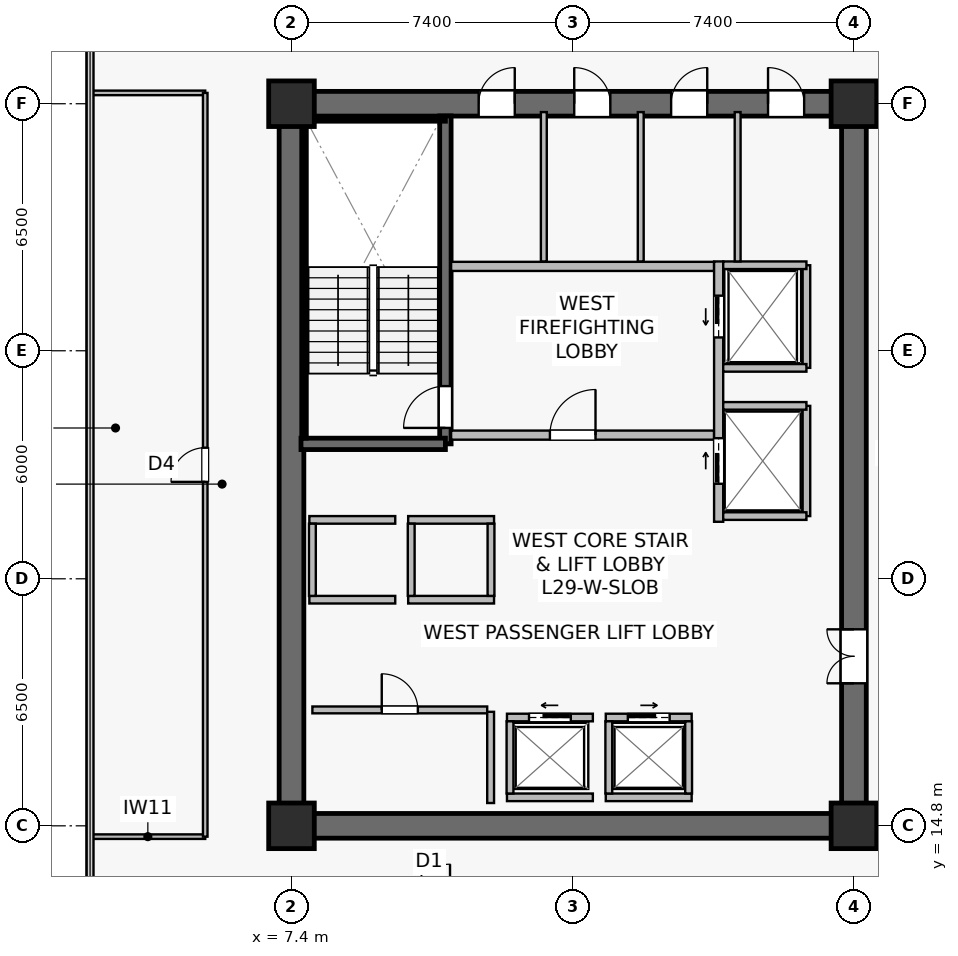
"""IFC4 building model, lengths in metres.
Left out: names, types, materials, properties, quantities, classifications, styles, units other than length and angle.
Written with IfcOpenShell. Run it as: python <this file> out.ifc"""

import sys

from ifc_helpers import new_model, si_unit, direction, frame, frame_2d, origin, origin_2d, place, context, subcontext, project, spatial, rectangle, extrude, source, transform, mapped, element, fill, save


model = new_model("IFC4")
c1 = context("Model", 3, precision=1e-05, world=origin(), true_north=direction((0.0, 1.0)))
c2 = subcontext(c1, "Body", "Model", "MODEL_VIEW")
j1 = project(units=[si_unit("LENGTHUNIT", "METRE"), si_unit("PLANEANGLEUNIT", "RADIAN")], contexts=[c1])
p1 = place(None, origin())
s1 = spatial("IfcSite", under=j1, at=p1, CompositionType="ELEMENT")
p2 = place(p1, origin())
s2 = spatial("IfcBuilding", under=s1, at=p2, CompositionType="ELEMENT")
p3 = place(p2, frame((0.0, 0.0, 121.5)))
s3 = spatial("IfcBuildingStorey", under=s2, at=p3, CompositionType="ELEMENT", Elevation=121.5)
p4 = place(p3, frame((7.075, 14.8, 0.0), z_axis=(0.0, 0.0, 1.0), x_axis=(1.0, 0.0, 0.0)))
e1 = element("IfcWall", 1, at=p4, inside=s3, PredefinedType="SHEAR", context=c2, shape_type="SweptSolid", body=[
    extrude(rectangle(XDim=15.45, YDim=0.65, at=frame_2d((7.725, 0.0))), origin(), (0.0, 0.0, 1.0), 3.79),
])
p5 = place(p3, frame((7.075, 33.8, 0.0), z_axis=(0.0, 0.0, 1.0), x_axis=(1.0, 0.0, 0.0)))
e2 = element("IfcWall", 2, at=p5, inside=s3, PredefinedType="SHEAR", context=c2, shape_type="SweptSolid", body=[
    extrude(rectangle(XDim=15.45, YDim=0.65, at=frame_2d((7.725, 0.0))), origin(), (0.0, 0.0, 1.0), 3.79),
])
p6 = place(p5, frame((5.25, 0.0, 0.0)))
e3 = element("IfcOpeningElement", 3, at=p6, cuts=e2, PredefinedType="OPENING", context=c2, shape_type="SweptSolid", body=[
    extrude(rectangle(XDim=0.95, YDim=2.15, at=frame_2d((0.475, 1.075))), frame((0.0, 0.335, 0.0), z_axis=(0.0, -1.0, 0.0), x_axis=(1.0, 0.0, 0.0)), (0.0, 0.0, 1.0), 0.67),
])
p7 = place(p5, frame((7.765, 0.0, 0.0)))
e4 = element("IfcOpeningElement", 4, at=p7, cuts=e2, PredefinedType="OPENING", context=c2, shape_type="SweptSolid", body=[
    extrude(rectangle(XDim=0.95, YDim=2.15, at=frame_2d((0.475, 1.075))), frame((0.0, 0.335, 0.0), z_axis=(0.0, -1.0, 0.0), x_axis=(1.0, 0.0, 0.0)), (0.0, 0.0, 1.0), 0.67),
])
p8 = place(p5, frame((10.315, 0.0, 0.0)))
e5 = element("IfcOpeningElement", 5, at=p8, cuts=e2, PredefinedType="OPENING", context=c2, shape_type="SweptSolid", body=[
    extrude(rectangle(XDim=0.95, YDim=2.15, at=frame_2d((0.475, 1.075))), frame((0.0, 0.335, 0.0), z_axis=(0.0, -1.0, 0.0), x_axis=(1.0, 0.0, 0.0)), (0.0, 0.0, 1.0), 0.67),
])
p9 = place(p5, frame((12.865, 0.0, 0.0)))
e6 = element("IfcOpeningElement", 6, at=p9, cuts=e2, PredefinedType="OPENING", context=c2, shape_type="SweptSolid", body=[
    extrude(rectangle(XDim=0.95, YDim=2.15, at=frame_2d((0.475, 1.075))), frame((0.0, 0.335, 0.0), z_axis=(0.0, -1.0, 0.0), x_axis=(1.0, 0.0, 0.0)), (0.0, 0.0, 1.0), 0.67),
])
p10 = place(p3, frame((7.4, 15.125, 0.0), z_axis=(0.0, 0.0, 1.0), x_axis=(0.0, 1.0, 0.0)))
e7 = element("IfcWall", 7, at=p10, inside=s3, PredefinedType="SHEAR", context=c2, shape_type="SweptSolid", body=[
    extrude(rectangle(XDim=18.35, YDim=0.65, at=frame_2d((9.175, 0.0))), origin(), (0.0, 0.0, 1.0), 3.79),
])
p11 = place(p3, frame((22.2, 15.125, 0.0), z_axis=(0.0, 0.0, 1.0), x_axis=(0.0, 1.0, 0.0)))
e8 = element("IfcWall", 8, at=p11, inside=s3, PredefinedType="SHEAR", context=c2, shape_type="SweptSolid", body=[
    extrude(rectangle(XDim=18.35, YDim=0.65, at=frame_2d((9.175, 0.0))), origin(), (0.0, 0.0, 1.0), 3.79),
])
p12 = place(p11, frame((3.425, 0.0, 0.0)))
e9 = element("IfcOpeningElement", 9, at=p12, cuts=e8, PredefinedType="OPENING", context=c2, shape_type="SweptSolid", body=[
    extrude(rectangle(XDim=1.42, YDim=2.2, at=frame_2d((0.71, 1.1))), frame((0.0, 0.335, 0.0), z_axis=(0.0, -1.0, 0.0), x_axis=(1.0, 0.0, 0.0)), (0.0, 0.0, 1.0), 0.67),
])
p13 = place(p3, frame((11.45, 24.85, 0.0), z_axis=(0.0, 0.0, 1.0), x_axis=(0.0, 1.0, 0.0)))
e10 = element("IfcWall", 10, at=p13, inside=s3, PredefinedType="SHEAR", context=c2, shape_type="SweptSolid", body=[
    extrude(rectangle(XDim=8.63, YDim=0.3, at=frame_2d((4.315, 0.0))), origin(), (0.0, 0.0, 1.0), 3.79),
])
p14 = place(p13, frame((0.42, 0.0, 0.0)))
e11 = element("IfcOpeningElement", 11, at=p14, cuts=e10, PredefinedType="OPENING", context=c2, shape_type="SweptSolid", body=[
    extrude(rectangle(XDim=1.1, YDim=2.15, at=frame_2d((0.55, 1.075))), frame((0.0, 0.16, 0.0), z_axis=(0.0, -1.0, 0.0), x_axis=(1.0, 0.0, 0.0)), (0.0, 0.0, 1.0), 0.32),
])
p15 = place(p3, frame((7.65, 24.85, 0.0), z_axis=(0.0, 0.0, 1.0), x_axis=(1.0, 0.0, 0.0)))
e12 = element("IfcWall", 12, at=p15, inside=s3, PredefinedType="SHEAR", context=c2, shape_type="SweptSolid", body=[
    extrude(rectangle(XDim=3.8, YDim=0.3, at=frame_2d((1.9, 0.0))), origin(), (0.0, 0.0, 1.0), 3.79),
])
p16 = place(p3, frame((7.73, 33.4, 0.0), z_axis=(0.0, 0.0, 1.0), x_axis=(1.0, 0.0, 0.0)))
e13 = element("IfcWall", 13, at=p16, inside=s3, PredefinedType="SOLIDWALL", context=c2, shape_type="SweptSolid", body=[
    extrude(rectangle(XDim=3.72, YDim=0.12, at=frame_2d((1.86, 0.0))), origin(), (0.0, 0.0, 1.0), 3.79),
])
p17 = place(p3, frame((7.73, 25.0, 0.0), z_axis=(0.0, 0.0, 1.0), x_axis=(0.0, 1.0, 0.0)))
e14 = element("IfcWall", 14, at=p17, inside=s3, PredefinedType="SOLIDWALL", context=c2, shape_type="SweptSolid", body=[
    extrude(rectangle(XDim=8.32, YDim=0.12, at=frame_2d((4.16, 0.0))), origin(), (0.0, 0.0, 1.0), 3.79),
])
m1 = source(origin(), c2, "Body", "SweptSolid", [
    extrude(rectangle(XDim=1.2, YDim=1.2, at=origin_2d()), origin(), (0.0, 0.0, 1.0), 4.1),
])
for number, where, z_axis, x_axis in (
    (15, (7.4, 14.8, 0.0), (0.0, 0.0, 1.0), (1.0, 0.0, 0.0)),
    (16, (22.2, 14.8, 0.0), (0.0, 0.0, 1.0), (1.0, 0.0, 0.0)),
    (17, (7.4, 33.8, 0.0), (0.0, 0.0, 1.0), (1.0, 0.0, 0.0)),
    (18, (22.2, 33.8, 0.0), (0.0, 0.0, 1.0), (1.0, 0.0, 0.0)),
):
    element("IfcColumn", number, at=place(p3, frame(where, z_axis=z_axis, x_axis=x_axis)), inside=s3, PredefinedType="COLUMN", context=c2, shape_type="MappedRepresentation", body=[
        mapped(m1, transform((0.0, 0.0, 0.0), scale=1.0)),
    ])
p18 = place(p3, frame((11.6, 25.08, 0.0), z_axis=(0.0, 0.0, 1.0), x_axis=(1.0, 0.0, 0.0)))
e19 = element("IfcWall", 19, at=p18, inside=s3, PredefinedType="SOLIDWALL", context=c2, shape_type="SweptSolid", body=[
    extrude(rectangle(XDim=6.92, YDim=0.24, at=frame_2d((3.46, 0.0))), origin(), (0.0, 0.0, 1.0), 3.125),
])
p19 = place(p18, frame((2.6, 0.0, 0.0)))
e20 = element("IfcOpeningElement", 20, at=p19, cuts=e19, PredefinedType="OPENING", context=c2, shape_type="SweptSolid", body=[
    extrude(rectangle(XDim=1.2, YDim=2.16, at=frame_2d((0.6, 1.08))), frame((0.0, 0.13, 0.0), z_axis=(0.0, -1.0, 0.0), x_axis=(1.0, 0.0, 0.0)), (0.0, 0.0, 1.0), 0.26),
])
p20 = place(p3, frame((11.6, 29.52, 0.0), z_axis=(0.0, 0.0, 1.0), x_axis=(1.0, 0.0, 0.0)))
e21 = element("IfcWall", 21, at=p20, inside=s3, PredefinedType="SOLIDWALL", context=c2, shape_type="SweptSolid", body=[
    extrude(rectangle(XDim=6.92, YDim=0.24, at=frame_2d((3.46, 0.0))), origin(), (0.0, 0.0, 1.0), 3.125),
])
p21 = place(p3, frame((18.64, 22.8, 0.0), z_axis=(0.0, 0.0, 1.0), x_axis=(0.0, 1.0, 0.0)))
e22 = element("IfcWall", 22, at=p21, inside=s3, PredefinedType="SOLIDWALL", context=c2, shape_type="SweptSolid", body=[
    extrude(rectangle(XDim=6.85, YDim=0.24, at=frame_2d((3.425, 0.0))), origin(), (0.0, 0.0, 1.0), 2.875),
])
p22 = place(p21, frame((4.85, 0.0, 0.0)))
e23 = element("IfcOpeningElement", 23, at=p22, cuts=e22, PredefinedType="OPENING", context=c2, shape_type="SweptSolid", body=[
    extrude(rectangle(XDim=1.1, YDim=2.22, at=frame_2d((0.55, 1.11))), frame((0.0, 0.13, 0.0), z_axis=(0.0, -1.0, 0.0), x_axis=(1.0, 0.0, 0.0)), (0.0, 0.0, 1.0), 0.26),
])
p23 = place(p21, frame((1.0, 0.0, 0.0)))
e24 = element("IfcOpeningElement", 24, at=p23, cuts=e22, PredefinedType="OPENING", context=c2, shape_type="SweptSolid", body=[
    extrude(rectangle(XDim=1.2, YDim=2.22, at=frame_2d((0.6, 1.11))), frame((0.0, 0.13, 0.0), z_axis=(0.0, -1.0, 0.0), x_axis=(1.0, 0.0, 0.0)), (0.0, 0.0, 1.0), 0.26),
])
p24 = place(p3, frame((13.07, 17.65, 0.0), z_axis=(0.0, 0.0, 1.0), x_axis=(1.0, 0.0, 0.0)))
e25 = element("IfcWall", 25, at=p24, inside=s3, PredefinedType="SOLIDWALL", context=c2, shape_type="SweptSolid", body=[
    extrude(rectangle(XDim=2.26, YDim=0.2, at=frame_2d((1.13, 0.0))), origin(), (0.0, 0.0, 1.0), 3.125),
])
p25 = place(p24, frame((0.58, 0.0, 0.0)))
e26 = element("IfcOpeningElement", 26, at=p25, cuts=e25, PredefinedType="OPENING", context=c2, shape_type="SweptSolid", body=[
    extrude(rectangle(XDim=1.1, YDim=2.22, at=frame_2d((0.55, 1.11))), frame((0.0, 0.11, 0.0), z_axis=(0.0, -1.0, 0.0), x_axis=(1.0, 0.0, 0.0)), (0.0, 0.0, 1.0), 0.22),
])
p26 = place(p3, frame((13.07, 15.55, 0.0), z_axis=(0.0, 0.0, 1.0), x_axis=(1.0, 0.0, 0.0)))
e27 = element("IfcWall", 27, at=p26, inside=s3, PredefinedType="SOLIDWALL", context=c2, shape_type="SweptSolid", body=[
    extrude(rectangle(XDim=2.26, YDim=0.2, at=frame_2d((1.13, 0.0))), origin(), (0.0, 0.0, 1.0), 3.125),
])
p27 = place(p3, frame((13.15, 15.65, 0.0), z_axis=(0.0, 0.0, 1.0), x_axis=(0.0, 1.0, 0.0)))
e28 = element("IfcWall", 28, at=p27, inside=s3, PredefinedType="SOLIDWALL", context=c2, shape_type="SweptSolid", body=[
    extrude(rectangle(XDim=1.9, YDim=0.18, at=frame_2d((0.95, 0.0))), origin(), (0.0, 0.0, 1.0), 3.79),
])
p28 = place(p3, frame((15.67, 17.65, 0.0), z_axis=(0.0, 0.0, 1.0), x_axis=(1.0, 0.0, 0.0)))
e29 = element("IfcWall", 29, at=p28, inside=s3, PredefinedType="SOLIDWALL", context=c2, shape_type="SweptSolid", body=[
    extrude(rectangle(XDim=2.26, YDim=0.2, at=frame_2d((1.13, 0.0))), origin(), (0.0, 0.0, 1.0), 3.79),
])
p29 = place(p28, frame((0.58, 0.0, 0.0)))
e30 = element("IfcOpeningElement", 30, at=p29, cuts=e29, PredefinedType="OPENING", context=c2, shape_type="SweptSolid", body=[
    extrude(rectangle(XDim=1.1, YDim=2.22, at=frame_2d((0.55, 1.11))), frame((0.0, 0.11, 0.0), z_axis=(0.0, -1.0, 0.0), x_axis=(1.0, 0.0, 0.0)), (0.0, 0.0, 1.0), 0.22),
])
p30 = place(p3, frame((15.67, 15.55, 0.0), z_axis=(0.0, 0.0, 1.0), x_axis=(1.0, 0.0, 0.0)))
e31 = element("IfcWall", 31, at=p30, inside=s3, PredefinedType="SOLIDWALL", context=c2, shape_type="SweptSolid", body=[
    extrude(rectangle(XDim=2.26, YDim=0.2, at=frame_2d((1.13, 0.0))), origin(), (0.0, 0.0, 1.0), 3.79),
])
for number, where, z_axis, x_axis in (
    (32, (15.75, 15.65, 0.0), (0.0, 0.0, 1.0), (0.0, 1.0, 0.0)),
    (33, (17.85, 15.65, 0.0), (0.0, 0.0, 1.0), (0.0, 1.0, 0.0)),
):
    element("IfcWall", number, at=place(p3, frame(where, z_axis=z_axis, x_axis=x_axis)), inside=s3, PredefinedType="SOLIDWALL", context=c2, shape_type="SweptSolid", body=[
        extrude(rectangle(XDim=1.9, YDim=0.18, at=frame_2d((0.95, 0.0))), origin(), (0.0, 0.0, 1.0), 3.79),
    ])
for number, where, z_axis, x_axis in (
    (34, (7.87, 20.75, 0.0), (0.0, 0.0, 1.0), (1.0, 0.0, 0.0)),
    (35, (7.87, 22.85, 0.0), (0.0, 0.0, 1.0), (1.0, 0.0, 0.0)),
):
    element("IfcWall", number, at=place(p3, frame(where, z_axis=z_axis, x_axis=x_axis)), inside=s3, PredefinedType="SOLIDWALL", context=c2, shape_type="SweptSolid", body=[
        extrude(rectangle(XDim=2.26, YDim=0.2, at=frame_2d((1.13, 0.0))), origin(), (0.0, 0.0, 1.0), 3.79),
    ])
p31 = place(p3, frame((7.95, 20.85, 0.0), z_axis=(0.0, 0.0, 1.0), x_axis=(0.0, 1.0, 0.0)))
e36 = element("IfcWall", 36, at=p31, inside=s3, PredefinedType="SOLIDWALL", context=c2, shape_type="SweptSolid", body=[
    extrude(rectangle(XDim=1.9, YDim=0.18, at=frame_2d((0.95, 0.0))), origin(), (0.0, 0.0, 1.0), 3.79),
])
for number, where, z_axis, x_axis in (
    (37, (10.47, 20.75, 0.0), (0.0, 0.0, 1.0), (1.0, 0.0, 0.0)),
    (38, (10.47, 22.85, 0.0), (0.0, 0.0, 1.0), (1.0, 0.0, 0.0)),
):
    element("IfcWall", number, at=place(p3, frame(where, z_axis=z_axis, x_axis=x_axis)), inside=s3, PredefinedType="SOLIDWALL", context=c2, shape_type="SweptSolid", body=[
        extrude(rectangle(XDim=2.26, YDim=0.2, at=frame_2d((1.13, 0.0))), origin(), (0.0, 0.0, 1.0), 3.79),
    ])
for number, where, z_axis, x_axis in (
    (39, (10.55, 20.85, 0.0), (0.0, 0.0, 1.0), (0.0, 1.0, 0.0)),
    (40, (12.65, 20.85, 0.0), (0.0, 0.0, 1.0), (0.0, 1.0, 0.0)),
):
    element("IfcWall", number, at=place(p3, frame(where, z_axis=z_axis, x_axis=x_axis)), inside=s3, PredefinedType="SOLIDWALL", context=c2, shape_type="SweptSolid", body=[
        extrude(rectangle(XDim=1.9, YDim=0.18, at=frame_2d((0.95, 0.0))), origin(), (0.0, 0.0, 1.0), 3.79),
    ])
p32 = place(p3, frame((20.95, 26.85, 0.0), z_axis=(0.0, 0.0, 1.0), x_axis=(0.0, 1.0, 0.0)))
e41 = element("IfcWall", 41, at=p32, inside=s3, PredefinedType="SOLIDWALL", context=c2, shape_type="SweptSolid", body=[
    extrude(rectangle(XDim=2.7, YDim=0.2, at=frame_2d((1.35, 0.0))), origin(), (0.0, 0.0, 1.0), 3.79),
])
p33 = place(p3, frame((18.76, 29.55, 0.0), z_axis=(0.0, 0.0, 1.0), x_axis=(1.0, 0.0, 0.0)))
e42 = element("IfcWall", 42, at=p33, inside=s3, PredefinedType="SOLIDWALL", context=c2, shape_type="SweptSolid", body=[
    extrude(rectangle(XDim=2.19, YDim=0.2, at=frame_2d((1.095, 0.0))), origin(), (0.0, 0.0, 1.0), 3.79),
])
p34 = place(p3, frame((18.76, 26.85, 0.0), z_axis=(0.0, 0.0, 1.0), x_axis=(1.0, 0.0, 0.0)))
e43 = element("IfcWall", 43, at=p34, inside=s3, PredefinedType="SOLIDWALL", context=c2, shape_type="SweptSolid", body=[
    extrude(rectangle(XDim=2.19, YDim=0.2, at=frame_2d((1.095, 0.0))), origin(), (0.0, 0.0, 1.0), 3.187),
])
p35 = place(p3, frame((20.95, 22.95, 0.0), z_axis=(0.0, 0.0, 1.0), x_axis=(0.0, 1.0, 0.0)))
e44 = element("IfcWall", 44, at=p35, inside=s3, PredefinedType="SOLIDWALL", context=c2, shape_type="SweptSolid", body=[
    extrude(rectangle(XDim=2.9, YDim=0.2, at=frame_2d((1.45, 0.0))), origin(), (0.0, 0.0, 1.0), 2.875),
])
for number, where, z_axis, x_axis in (
    (45, (18.76, 25.85, 0.0), (0.0, 0.0, 1.0), (1.0, 0.0, 0.0)),
    (46, (18.76, 22.95, 0.0), (0.0, 0.0, 1.0), (1.0, 0.0, 0.0)),
):
    element("IfcWall", number, at=place(p3, frame(where, z_axis=z_axis, x_axis=x_axis)), inside=s3, PredefinedType="SOLIDWALL", context=c2, shape_type="SweptSolid", body=[
        extrude(rectangle(XDim=2.19, YDim=0.2, at=frame_2d((1.095, 0.0))), origin(), (0.0, 0.0, 1.0), 3.79),
    ])
p36 = place(p3, frame((7.95, 17.85, 0.0), z_axis=(0.0, 0.0, 1.0), x_axis=(1.0, 0.0, 0.0)))
e47 = element("IfcWall", 47, at=p36, inside=s3, PredefinedType="SOLIDWALL", context=c2, shape_type="SweptSolid", body=[
    extrude(rectangle(XDim=4.6, YDim=0.18, at=frame_2d((2.3, 0.0))), origin(), (0.0, 0.0, 1.0), 3.79),
])
p37 = place(p36, frame((1.825, 0.0, 0.0)))
e48 = element("IfcOpeningElement", 48, at=p37, cuts=e47, PredefinedType="OPENING", context=c2, shape_type="SweptSolid", body=[
    extrude(rectangle(XDim=0.95, YDim=2.15, at=frame_2d((0.475, 1.075))), frame((0.0, 0.1, 0.0), z_axis=(0.0, -1.0, 0.0), x_axis=(1.0, 0.0, 0.0)), (0.0, 0.0, 1.0), 0.2),
])
p38 = place(p3, frame((12.64, 15.4, 0.0), z_axis=(0.0, 0.0, 1.0), x_axis=(0.0, 1.0, 0.0)))
e49 = element("IfcWall", 49, at=p38, inside=s3, PredefinedType="SOLIDWALL", context=c2, shape_type="SweptSolid", body=[
    extrude(rectangle(XDim=2.4, YDim=0.18, at=frame_2d((1.2, 0.0))), origin(), (0.0, 0.0, 1.0), 3.79),
])
for number, where, z_axis, x_axis in (
    (50, (14.04, 29.65, 0.0), (0.0, 0.0, 1.0), (0.0, 1.0, 0.0)),
    (51, (16.59, 29.65, 0.0), (0.0, 0.0, 1.0), (0.0, 1.0, 0.0)),
    (52, (19.14, 29.65, 0.0), (0.0, 0.0, 1.0), (0.0, 1.0, 0.0)),
):
    element("IfcWall", number, at=place(p3, frame(where, z_axis=z_axis, x_axis=x_axis)), inside=s3, PredefinedType="PLUMBINGWALL", context=c2, shape_type="SweptSolid", body=[
        extrude(rectangle(XDim=3.93, YDim=0.155, at=frame_2d((1.965, 0.0))), origin(), (0.0, 0.0, 1.0), 3.79),
    ])
for number, where, z_axis, x_axis in (
    (53, (2.11, 14.515, 0.0), (0.0, 0.0, 1.0), (1.0, 0.0, 0.0)),
    (54, (2.11, 34.085, 0.0), (0.0, 0.0, 1.0), (1.0, 0.0, 0.0)),
):
    element("IfcWall", number, at=place(p3, frame(where, z_axis=z_axis, x_axis=x_axis)), inside=s3, PredefinedType="PARTITIONING", context=c2, shape_type="SweptSolid", body=[
        extrude(rectangle(XDim=3.02, YDim=0.12, at=frame_2d((1.51, 0.0))), origin(), (0.0, 0.0, 1.0), 3.79),
    ])
p39 = place(p3, frame((5.13, 14.515, 0.0), z_axis=(0.0, 0.0, 1.0), x_axis=(0.0, 1.0, 0.0)))
e55 = element("IfcWall", 55, at=p39, inside=s3, PredefinedType="PARTITIONING", context=c2, shape_type="SweptSolid", body=[
    extrude(rectangle(XDim=19.57, YDim=0.12, at=frame_2d((9.785, 0.0))), origin(), (0.0, 0.0, 1.0), 3.79),
])
p40 = place(p39, frame((9.335, 0.0, 0.0)))
e56 = element("IfcOpeningElement", 56, at=p40, cuts=e55, PredefinedType="OPENING", context=c2, shape_type="SweptSolid", body=[
    extrude(rectangle(XDim=0.9, YDim=2.1, at=frame_2d((0.45, 1.05))), frame((0.0, 0.07, 0.0), z_axis=(0.0, -1.0, 0.0), x_axis=(1.0, 0.0, 0.0)), (0.0, 0.0, 1.0), 0.14),
])
m2 = source(origin(), c2, "Body", "SweptSolid", [
    extrude(rectangle(XDim=1.1, YDim=2.15, at=frame_2d((0.55, 1.075))), frame((0.0, 0.025, 0.0), z_axis=(0.0, -1.0, 0.0), x_axis=(1.0, 0.0, 0.0)), (0.0, 0.0, 1.0), 0.05),
])
p41 = place(p14, origin())
e57 = element("IfcDoor", 57, at=p41, inside=s3, OperationType="SINGLE_SWING_LEFT", PredefinedType="DOOR", context=c2, shape_type="MappedRepresentation", body=[
    mapped(m2, transform((0.0, 0.0, 0.0), scale=1.0)),
])
fill(e11, e57)
m3 = source(origin(), c2, "Body", "SweptSolid", [
    extrude(rectangle(XDim=1.2, YDim=2.16, at=frame_2d((0.6, 1.08))), frame((0.0, 0.025, 0.0), z_axis=(0.0, -1.0, 0.0), x_axis=(1.0, 0.0, 0.0)), (0.0, 0.0, 1.0), 0.05),
])
p42 = place(p19, origin())
e58 = element("IfcDoor", 58, at=p42, inside=s3, OperationType="SINGLE_SWING_RIGHT", PredefinedType="DOOR", context=c2, shape_type="MappedRepresentation", body=[
    mapped(m3, transform((0.0, 0.0, 0.0), scale=1.0)),
])
fill(e20, e58)
m4 = source(origin(), c2, "Body", "SweptSolid", [
    extrude(rectangle(XDim=1.1, YDim=2.22, at=frame_2d((0.55, 1.11))), frame((0.0, 0.025, 0.0), z_axis=(0.0, -1.0, 0.0), x_axis=(1.0, 0.0, 0.0)), (0.0, 0.0, 1.0), 0.05),
])
p43 = place(p25, origin())
e59 = element("IfcDoor", 59, at=p43, inside=s3, OperationType="SLIDING_TO_LEFT", PredefinedType="USERDEFINED", context=c2, shape_type="MappedRepresentation", body=[
    mapped(m4, transform((0.0, 0.0, 0.0), scale=1.0)),
])
fill(e26, e59)
p44 = place(p29, origin())
e60 = element("IfcDoor", 60, at=p44, inside=s3, OperationType="SLIDING_TO_RIGHT", PredefinedType="USERDEFINED", context=c2, shape_type="MappedRepresentation", body=[
    mapped(m4, transform((0.0, 0.0, 0.0), scale=1.0)),
])
fill(e30, e60)
p45 = place(p22, origin())
e61 = element("IfcDoor", 61, at=p45, inside=s3, OperationType="SLIDING_TO_LEFT", PredefinedType="USERDEFINED", context=c2, shape_type="MappedRepresentation", body=[
    mapped(m4, transform((0.0, 0.0, 0.0), scale=1.0)),
])
fill(e23, e61)
m5 = source(origin(), c2, "Body", "SweptSolid", [
    extrude(rectangle(XDim=1.2, YDim=2.22, at=frame_2d((0.6, 1.11))), frame((0.0, 0.025, 0.0), z_axis=(0.0, -1.0, 0.0), x_axis=(1.0, 0.0, 0.0)), (0.0, 0.0, 1.0), 0.05),
])
p46 = place(p23, origin())
e62 = element("IfcDoor", 62, at=p46, inside=s3, OperationType="SLIDING_TO_RIGHT", PredefinedType="USERDEFINED", context=c2, shape_type="MappedRepresentation", body=[
    mapped(m5, transform((0.0, 0.0, 0.0), scale=1.0)),
])
fill(e24, e62)
m6 = source(origin(), c2, "Body", "SweptSolid", [
    extrude(rectangle(XDim=0.95, YDim=2.15, at=frame_2d((0.475, 1.075))), frame((0.0, 0.025, 0.0), z_axis=(0.0, -1.0, 0.0), x_axis=(1.0, 0.0, 0.0)), (0.0, 0.0, 1.0), 0.05),
])
p47 = place(p37, origin())
e63 = element("IfcDoor", 63, at=p47, inside=s3, OperationType="SINGLE_SWING_LEFT", PredefinedType="DOOR", context=c2, shape_type="MappedRepresentation", body=[
    mapped(m6, transform((0.0, 0.0, 0.0), scale=1.0)),
])
fill(e48, e63)
m7 = source(origin(), c2, "Body", "SweptSolid", [
    extrude(rectangle(XDim=1.42, YDim=2.2, at=frame_2d((0.71, 1.1))), frame((0.0, 0.025, 0.0), z_axis=(0.0, -1.0, 0.0), x_axis=(1.0, 0.0, 0.0)), (0.0, 0.0, 1.0), 0.05),
])
p48 = place(p12, origin())
e64 = element("IfcDoor", 64, at=p48, inside=s3, OperationType="DOUBLE_DOOR_SINGLE_SWING", PredefinedType="DOOR", context=c2, shape_type="MappedRepresentation", body=[
    mapped(m7, transform((0.0, 0.0, 0.0), scale=1.0)),
])
fill(e9, e64)
p49 = place(p6, origin())
e65 = element("IfcDoor", 65, at=p49, inside=s3, OperationType="SINGLE_SWING_RIGHT", PredefinedType="DOOR", context=c2, shape_type="MappedRepresentation", body=[
    mapped(m6, transform((0.0, 0.0, 0.0), scale=1.0)),
])
fill(e3, e65)
p50 = place(p7, origin())
e66 = element("IfcDoor", 66, at=p50, inside=s3, OperationType="SINGLE_SWING_LEFT", PredefinedType="DOOR", context=c2, shape_type="MappedRepresentation", body=[
    mapped(m6, transform((0.0, 0.0, 0.0), scale=1.0)),
])
fill(e4, e66)
p51 = place(p8, origin())
e67 = element("IfcDoor", 67, at=p51, inside=s3, OperationType="SINGLE_SWING_RIGHT", PredefinedType="DOOR", context=c2, shape_type="MappedRepresentation", body=[
    mapped(m6, transform((0.0, 0.0, 0.0), scale=1.0)),
])
fill(e5, e67)
p52 = place(p9, origin())
e68 = element("IfcDoor", 68, at=p52, inside=s3, OperationType="SINGLE_SWING_LEFT", PredefinedType="DOOR", context=c2, shape_type="MappedRepresentation", body=[
    mapped(m6, transform((0.0, 0.0, 0.0), scale=1.0)),
])
fill(e6, e68)
m8 = source(origin(), c2, "Body", "SweptSolid", [
    extrude(rectangle(XDim=0.9, YDim=2.1, at=frame_2d((0.45, 1.05))), frame((0.0, 0.025, 0.0), z_axis=(0.0, -1.0, 0.0), x_axis=(1.0, 0.0, 0.0)), (0.0, 0.0, 1.0), 0.05),
])
p53 = place(p40, origin())
e69 = element("IfcDoor", 69, at=p53, inside=s3, OperationType="SINGLE_SWING_LEFT", PredefinedType="DOOR", context=c2, shape_type="MappedRepresentation", body=[
    mapped(m8, transform((0.0, 0.0, 0.0), scale=1.0)),
])
fill(e56, e69)
save(model, sys.argv[1])
